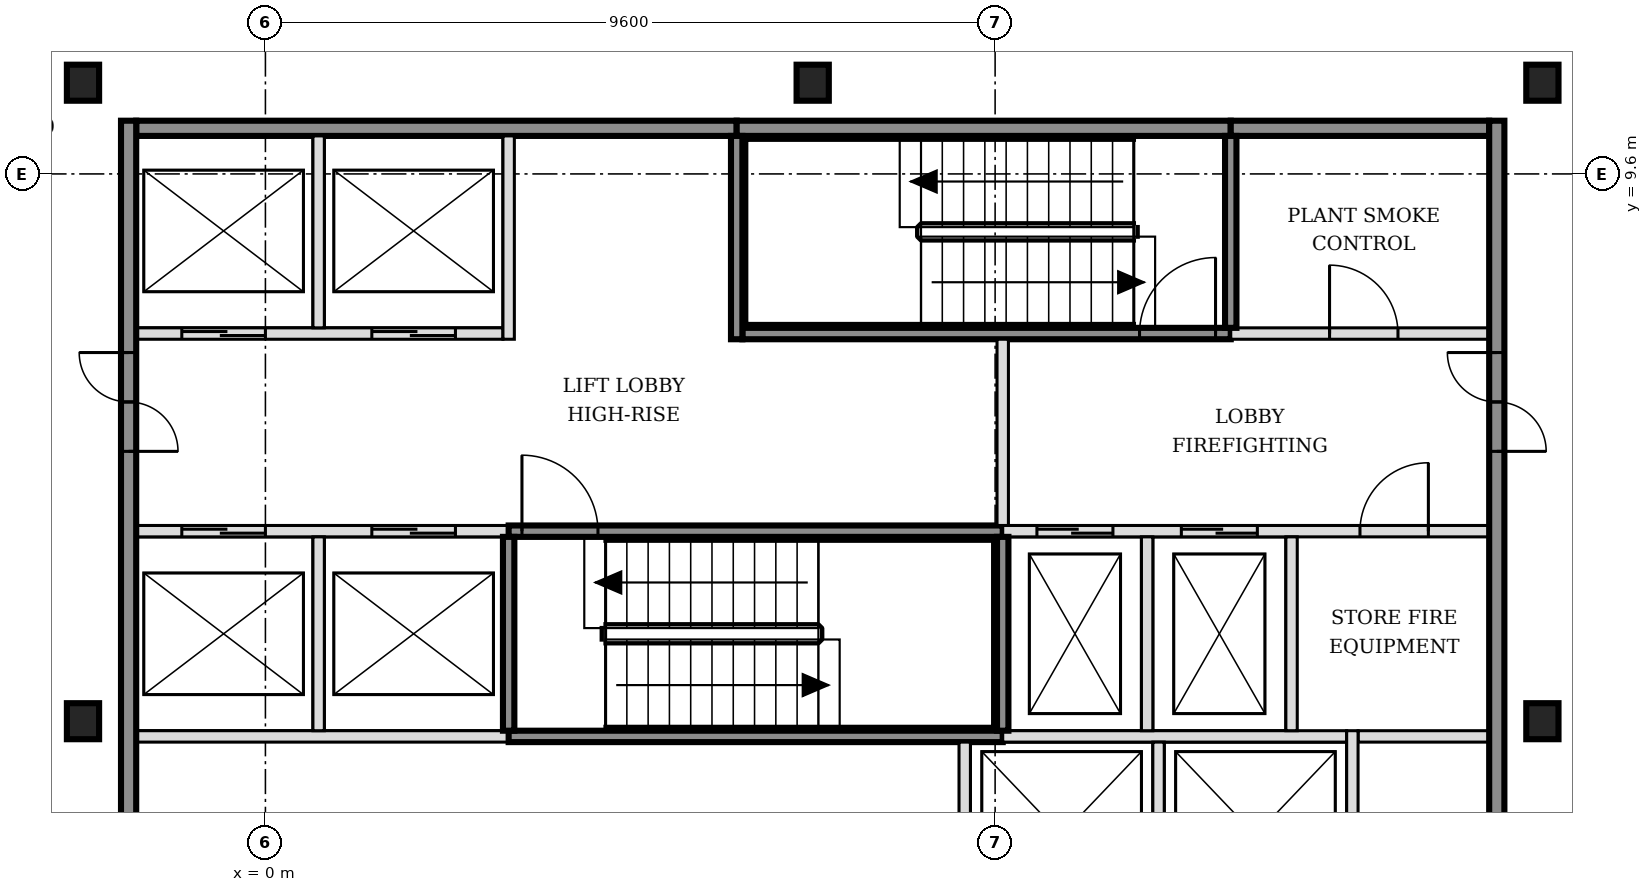
"""IFC4 building model, lengths in metres.
Left out: names, types, materials, properties, quantities, classifications, styles, units other than length and angle.
Written with IfcOpenShell. Run it as: python <this file> out.ifc"""

import sys

from ifc_helpers import new_model, si_unit, direction, frame, frame_2d, origin, origin_2d, place, context, subcontext, project, spatial, rectangle, i_section, extrude, element, fill, save


model = new_model("IFC4")
c1 = context("Model", 3, precision=1e-05, world=origin(), true_north=direction((0.0, 1.0)))
c2 = subcontext(c1, "Body", "Model", "MODEL_VIEW")
j1 = project(units=[si_unit("LENGTHUNIT", "METRE"), si_unit("PLANEANGLEUNIT", "RADIAN")], contexts=[c1])
p1 = place(None, origin())
s1 = spatial("IfcSite", under=j1, at=p1, CompositionType="ELEMENT")
p2 = place(p1, origin())
s2 = spatial("IfcBuilding", under=s1, at=p2, CompositionType="ELEMENT")
p3 = place(p2, frame((0.0, 0.0, 143.4)))
s3 = spatial("IfcBuildingStorey", under=s2, at=p3, CompositionType="ELEMENT", Elevation=143.4)
for number, where, z_axis, x_axis in (
    (1, (-2.4, 2.4, -0.15), (0.0, 0.0, 1.0), (1.0, 0.0, 0.0)),
    (2, (16.8, 2.4, -0.15), (0.0, 0.0, 1.0), (1.0, 0.0, 0.0)),
    (3, (-2.4, 10.8, -0.15), (0.0, 0.0, 1.0), (1.0, 0.0, 0.0)),
    (4, (7.2, 10.8, -0.15), (0.0, 0.0, 1.0), (1.0, 0.0, 0.0)),
    (5, (16.8, 10.8, -0.15), (0.0, 0.0, 1.0), (1.0, 0.0, 0.0)),
):
    element("IfcColumn", number, at=place(p3, frame(where, z_axis=z_axis, x_axis=x_axis)), inside=s3, PredefinedType="COLUMN", context=c2, shape_type="SweptSolid", body=[
        extrude(i_section(OverallWidth=0.424, OverallDepth=0.474, WebThickness=0.048, FlangeThickness=0.077, FilletRadius=0.015, at=origin_2d()), origin(), (0.0, 0.0, 1.0), 3.6),
    ])
p4 = place(p3, frame((-1.7, 2.2, 0.0), z_axis=(0.0, 0.0, 1.0), x_axis=(1.0, 0.0, 0.0)))
e6 = element("IfcWall", 6, at=p4, inside=s3, PredefinedType="SOLIDWALL", context=c2, shape_type="SweptSolid", body=[
    extrude(rectangle(XDim=4.9, YDim=0.15, at=frame_2d((2.45, 0.0))), origin(), (0.0, 0.0, 1.0), 3.45),
])
p5 = place(p3, frame((3.2, 2.2, 0.0), z_axis=(0.0, 0.0, 1.0), x_axis=(1.0, 0.0, 0.0)))
e7 = element("IfcWall", 7, at=p5, inside=s3, PredefinedType="SOLIDWALL", context=c2, shape_type="SweptSolid", body=[
    extrude(rectangle(XDim=6.5, YDim=0.15, at=frame_2d((3.25, 0.0))), origin(), (0.0, 0.0, 1.0), 3.45),
])
p6 = place(p3, frame((9.7, 2.2, 0.0), z_axis=(0.0, 0.0, 1.0), x_axis=(1.0, 0.0, 0.0)))
e8 = element("IfcWall", 8, at=p6, inside=s3, PredefinedType="SOLIDWALL", context=c2, shape_type="SweptSolid", body=[
    extrude(rectangle(XDim=4.525, YDim=0.15, at=frame_2d((2.263, 0.0))), origin(), (0.0, 0.0, 1.0), 3.45),
])
p7 = place(p3, frame((14.375, 2.2, 0.0), z_axis=(0.0, 0.0, 1.0), x_axis=(1.0, 0.0, 0.0)))
e9 = element("IfcWall", 9, at=p7, inside=s3, PredefinedType="PARTITIONING", context=c2, shape_type="SweptSolid", body=[
    extrude(rectangle(XDim=1.725, YDim=0.15, at=frame_2d((0.863, 0.0))), origin(), (0.0, 0.0, 1.0), 3.45),
])
p8 = place(p3, frame((-1.7, 4.9, 0.0), z_axis=(0.0, 0.0, 1.0), x_axis=(1.0, 0.0, 0.0)))
e10 = element("IfcWall", 10, at=p8, inside=s3, PredefinedType="SOLIDWALL", context=c2, shape_type="SweptSolid", body=[
    extrude(rectangle(XDim=4.9, YDim=0.15, at=frame_2d((2.45, 0.0))), origin(), (0.0, 0.0, 1.0), 3.45),
])
p9 = place(p8, frame((0.6, 0.0, 0.0)))
e11 = element("IfcOpeningElement", 11, at=p9, cuts=e10, PredefinedType="OPENING", context=c2, shape_type="SweptSolid", body=[
    extrude(rectangle(XDim=1.1, YDim=2.1, at=frame_2d((0.55, 1.05))), frame((0.0, 0.085, 0.0), z_axis=(0.0, -1.0, 0.0), x_axis=(1.0, 0.0, 0.0)), (0.0, 0.0, 1.0), 0.17),
])
p10 = place(p8, frame((3.1, 0.0, 0.0)))
e12 = element("IfcOpeningElement", 12, at=p10, cuts=e10, PredefinedType="OPENING", context=c2, shape_type="SweptSolid", body=[
    extrude(rectangle(XDim=1.1, YDim=2.1, at=frame_2d((0.55, 1.05))), frame((0.0, 0.085, 0.0), z_axis=(0.0, -1.0, 0.0), x_axis=(1.0, 0.0, 0.0)), (0.0, 0.0, 1.0), 0.17),
])
p11 = place(p3, frame((3.2, 4.9, 0.0), z_axis=(0.0, 0.0, 1.0), x_axis=(1.0, 0.0, 0.0)))
e13 = element("IfcWall", 13, at=p11, inside=s3, PredefinedType="SOLIDWALL", context=c2, shape_type="SweptSolid", body=[
    extrude(rectangle(XDim=6.5, YDim=0.15, at=frame_2d((3.25, 0.0))), origin(), (0.0, 0.0, 1.0), 3.45),
])
p12 = place(p11, frame((0.175, 0.0, 0.0)))
e14 = element("IfcOpeningElement", 14, at=p12, cuts=e13, PredefinedType="OPENING", context=c2, shape_type="SweptSolid", body=[
    extrude(rectangle(XDim=1.0, YDim=2.1, at=frame_2d((0.5, 1.05))), frame((0.0, 0.085, 0.0), z_axis=(0.0, -1.0, 0.0), x_axis=(1.0, 0.0, 0.0)), (0.0, 0.0, 1.0), 0.17),
])
p13 = place(p3, frame((9.7, 4.9, 0.0), z_axis=(0.0, 0.0, 1.0), x_axis=(1.0, 0.0, 0.0)))
e15 = element("IfcWall", 15, at=p13, inside=s3, PredefinedType="SOLIDWALL", context=c2, shape_type="SweptSolid", body=[
    extrude(rectangle(XDim=6.4, YDim=0.15, at=frame_2d((3.2, 0.0))), origin(), (0.0, 0.0, 1.0), 3.45),
])
p14 = place(p13, frame((0.45, 0.0, 0.0)))
e16 = element("IfcOpeningElement", 16, at=p14, cuts=e15, PredefinedType="OPENING", context=c2, shape_type="SweptSolid", body=[
    extrude(rectangle(XDim=1.0, YDim=2.1, at=frame_2d((0.5, 1.05))), frame((0.0, 0.085, 0.0), z_axis=(0.0, -1.0, 0.0), x_axis=(1.0, 0.0, 0.0)), (0.0, 0.0, 1.0), 0.17),
])
p15 = place(p13, frame((2.35, 0.0, 0.0)))
e17 = element("IfcOpeningElement", 17, at=p15, cuts=e15, PredefinedType="OPENING", context=c2, shape_type="SweptSolid", body=[
    extrude(rectangle(XDim=1.0, YDim=2.1, at=frame_2d((0.5, 1.05))), frame((0.0, 0.085, 0.0), z_axis=(0.0, -1.0, 0.0), x_axis=(1.0, 0.0, 0.0)), (0.0, 0.0, 1.0), 0.17),
])
p16 = place(p13, frame((4.7, 0.0, 0.0)))
e18 = element("IfcOpeningElement", 18, at=p16, cuts=e15, PredefinedType="OPENING", context=c2, shape_type="SweptSolid", body=[
    extrude(rectangle(XDim=0.9, YDim=2.1, at=frame_2d((0.45, 1.05))), frame((0.0, 0.085, 0.0), z_axis=(0.0, -1.0, 0.0), x_axis=(1.0, 0.0, 0.0)), (0.0, 0.0, 1.0), 0.17),
])
p17 = place(p3, frame((-1.7, 7.5, 0.0), z_axis=(0.0, 0.0, 1.0), x_axis=(1.0, 0.0, 0.0)))
e19 = element("IfcWall", 19, at=p17, inside=s3, PredefinedType="SOLIDWALL", context=c2, shape_type="SweptSolid", body=[
    extrude(rectangle(XDim=4.825, YDim=0.15, at=frame_2d((2.413, 0.0))), origin(), (0.0, 0.0, 1.0), 3.45),
])
p18 = place(p17, frame((0.6, 0.0, 0.0)))
e20 = element("IfcOpeningElement", 20, at=p18, cuts=e19, PredefinedType="OPENING", context=c2, shape_type="SweptSolid", body=[
    extrude(rectangle(XDim=1.1, YDim=2.1, at=frame_2d((0.55, 1.05))), frame((0.0, 0.085, 0.0), z_axis=(0.0, -1.0, 0.0), x_axis=(1.0, 0.0, 0.0)), (0.0, 0.0, 1.0), 0.17),
])
p19 = place(p17, frame((3.1, 0.0, 0.0)))
e21 = element("IfcOpeningElement", 21, at=p19, cuts=e19, PredefinedType="OPENING", context=c2, shape_type="SweptSolid", body=[
    extrude(rectangle(XDim=1.1, YDim=2.1, at=frame_2d((0.55, 1.05))), frame((0.0, 0.085, 0.0), z_axis=(0.0, -1.0, 0.0), x_axis=(1.0, 0.0, 0.0)), (0.0, 0.0, 1.0), 0.17),
])
p20 = place(p3, frame((6.275, 7.5, 0.0), z_axis=(0.0, 0.0, 1.0), x_axis=(1.0, 0.0, 0.0)))
e22 = element("IfcWall", 22, at=p20, inside=s3, PredefinedType="SOLIDWALL", context=c2, shape_type="SweptSolid", body=[
    extrude(rectangle(XDim=6.425, YDim=0.15, at=frame_2d((3.212, 0.0))), origin(), (0.0, 0.0, 1.0), 3.45),
])
p21 = place(p20, frame((5.225, 0.0, 0.0)))
e23 = element("IfcOpeningElement", 23, at=p21, cuts=e22, PredefinedType="OPENING", context=c2, shape_type="SweptSolid", body=[
    extrude(rectangle(XDim=1.0, YDim=2.1, at=frame_2d((0.5, 1.05))), frame((0.0, 0.085, 0.0), z_axis=(0.0, -1.0, 0.0), x_axis=(1.0, 0.0, 0.0)), (0.0, 0.0, 1.0), 0.17),
])
p22 = place(p3, frame((12.7, 7.5, 0.0), z_axis=(0.0, 0.0, 1.0), x_axis=(1.0, 0.0, 0.0)))
e24 = element("IfcWall", 24, at=p22, inside=s3, PredefinedType="SOLIDWALL", context=c2, shape_type="SweptSolid", body=[
    extrude(rectangle(XDim=3.4, YDim=0.15, at=frame_2d((1.7, 0.0))), origin(), (0.0, 0.0, 1.0), 3.45),
])
p23 = place(p22, frame((1.3, 0.0, 0.0)))
e25 = element("IfcOpeningElement", 25, at=p23, cuts=e24, PredefinedType="OPENING", context=c2, shape_type="SweptSolid", body=[
    extrude(rectangle(XDim=0.9, YDim=2.1, at=frame_2d((0.45, 1.05))), frame((0.0, 0.085, 0.0), z_axis=(0.0, -1.0, 0.0), x_axis=(1.0, 0.0, 0.0)), (0.0, 0.0, 1.0), 0.17),
])
p24 = place(p3, frame((-1.7, 10.2, 0.0), z_axis=(0.0, 0.0, 1.0), x_axis=(1.0, 0.0, 0.0)))
e26 = element("IfcWall", 26, at=p24, inside=s3, PredefinedType="SOLIDWALL", context=c2, shape_type="SweptSolid", body=[
    extrude(rectangle(XDim=7.9, YDim=0.2, at=frame_2d((3.95, 0.0))), origin(), (0.0, 0.0, 1.0), 3.45),
])
p25 = place(p3, frame((6.2, 10.2, 0.0), z_axis=(0.0, 0.0, 1.0), x_axis=(1.0, 0.0, 0.0)))
e27 = element("IfcWall", 27, at=p25, inside=s3, PredefinedType="SOLIDWALL", context=c2, shape_type="SweptSolid", body=[
    extrude(rectangle(XDim=6.5, YDim=0.2, at=frame_2d((3.25, 0.0))), origin(), (0.0, 0.0, 1.0), 3.45),
])
p26 = place(p3, frame((12.7, 10.2, 0.0), z_axis=(0.0, 0.0, 1.0), x_axis=(1.0, 0.0, 0.0)))
e28 = element("IfcWall", 28, at=p26, inside=s3, PredefinedType="SOLIDWALL", context=c2, shape_type="SweptSolid", body=[
    extrude(rectangle(XDim=3.4, YDim=0.2, at=frame_2d((1.7, 0.0))), origin(), (0.0, 0.0, 1.0), 3.45),
])
p27 = place(p3, frame((-1.8, -5.5, 0.0), z_axis=(0.0, 0.0, 1.0), x_axis=(0.0, 1.0, 0.0)))
e29 = element("IfcWall", 29, at=p27, inside=s3, PredefinedType="SOLIDWALL", context=c2, shape_type="SweptSolid", body=[
    extrude(rectangle(XDim=15.8, YDim=0.2, at=frame_2d((7.9, 0.0))), origin(), (0.0, 0.0, 1.0), 3.45),
])
p28 = place(p27, frame((3.05, 0.0, 0.0)))
e30 = element("IfcOpeningElement", 30, at=p28, cuts=e29, PredefinedType="OPENING", context=c2, shape_type="SweptSolid", body=[
    extrude(rectangle(XDim=1.3, YDim=2.1, at=frame_2d((0.65, 1.05))), frame((0.0, 0.11, 0.0), z_axis=(0.0, -1.0, 0.0), x_axis=(1.0, 0.0, 0.0)), (0.0, 0.0, 1.0), 0.22),
])
p29 = place(p27, frame((11.45, 0.0, 0.0)))
e31 = element("IfcOpeningElement", 31, at=p29, cuts=e29, PredefinedType="OPENING", context=c2, shape_type="SweptSolid", body=[
    extrude(rectangle(XDim=1.3, YDim=2.1, at=frame_2d((0.65, 1.05))), frame((0.0, 0.11, 0.0), z_axis=(0.0, -1.0, 0.0), x_axis=(1.0, 0.0, 0.0)), (0.0, 0.0, 1.0), 0.22),
])
p30 = place(p3, frame((0.7, 2.275, 0.0), z_axis=(0.0, 0.0, 1.0), x_axis=(0.0, 1.0, 0.0)))
e32 = element("IfcWall", 32, at=p30, inside=s3, PredefinedType="SOLIDWALL", context=c2, shape_type="SweptSolid", body=[
    extrude(rectangle(XDim=2.55, YDim=0.15, at=frame_2d((1.275, 0.0))), origin(), (0.0, 0.0, 1.0), 3.45),
])
p31 = place(p3, frame((0.7, 7.575, 0.0), z_axis=(0.0, 0.0, 1.0), x_axis=(0.0, 1.0, 0.0)))
e33 = element("IfcWall", 33, at=p31, inside=s3, PredefinedType="SOLIDWALL", context=c2, shape_type="SweptSolid", body=[
    extrude(rectangle(XDim=2.525, YDim=0.15, at=frame_2d((1.263, 0.0))), origin(), (0.0, 0.0, 1.0), 3.45),
])
p32 = place(p3, frame((3.2, 2.275, 0.0), z_axis=(0.0, 0.0, 1.0), x_axis=(0.0, 1.0, 0.0)))
e34 = element("IfcWall", 34, at=p32, inside=s3, PredefinedType="SOLIDWALL", context=c2, shape_type="SweptSolid", body=[
    extrude(rectangle(XDim=2.55, YDim=0.15, at=frame_2d((1.275, 0.0))), origin(), (0.0, 0.0, 1.0), 3.45),
])
for number, where, z_axis, x_axis in (
    (35, (3.2, 7.425, 0.0), (0.0, 0.0, 1.0), (0.0, 1.0, 0.0)),
    (36, (6.2, 7.425, 0.0), (0.0, 0.0, 1.0), (0.0, 1.0, 0.0)),
):
    element("IfcWall", number, at=place(p3, frame(where, z_axis=z_axis, x_axis=x_axis)), inside=s3, PredefinedType="SOLIDWALL", context=c2, shape_type="SweptSolid", body=[
        extrude(rectangle(XDim=2.675, YDim=0.15, at=frame_2d((1.337, 0.0))), origin(), (0.0, 0.0, 1.0), 3.45),
    ])
p33 = place(p3, frame((9.2, -0.475, 0.0), z_axis=(0.0, 0.0, 1.0), x_axis=(0.0, 1.0, 0.0)))
e37 = element("IfcWall", 37, at=p33, inside=s3, PredefinedType="SOLIDWALL", context=c2, shape_type="SweptSolid", body=[
    extrude(rectangle(XDim=2.6, YDim=0.15, at=frame_2d((1.3, 0.0))), origin(), (0.0, 0.0, 1.0), 3.45),
])
p34 = place(p3, frame((9.7, 2.275, 0.0), z_axis=(0.0, 0.0, 1.0), x_axis=(0.0, 1.0, 0.0)))
e38 = element("IfcWall", 38, at=p34, inside=s3, PredefinedType="SOLIDWALL", context=c2, shape_type="SweptSolid", body=[
    extrude(rectangle(XDim=2.55, YDim=0.15, at=frame_2d((1.275, 0.0))), origin(), (0.0, 0.0, 1.0), 3.45),
])
p35 = place(p3, frame((9.7, 4.975, 0.0), z_axis=(0.0, 0.0, 1.0), x_axis=(0.0, 1.0, 0.0)))
e39 = element("IfcWall", 39, at=p35, inside=s3, PredefinedType="SOLIDWALL", context=c2, shape_type="SweptSolid", body=[
    extrude(rectangle(XDim=2.45, YDim=0.15, at=frame_2d((1.225, 0.0))), origin(), (0.0, 0.0, 1.0), 3.45),
])
p36 = place(p3, frame((11.6, 2.275, 0.0), z_axis=(0.0, 0.0, 1.0), x_axis=(0.0, 1.0, 0.0)))
e40 = element("IfcWall", 40, at=p36, inside=s3, PredefinedType="SOLIDWALL", context=c2, shape_type="SweptSolid", body=[
    extrude(rectangle(XDim=2.55, YDim=0.15, at=frame_2d((1.275, 0.0))), origin(), (0.0, 0.0, 1.0), 3.45),
])
p37 = place(p3, frame((11.75, -0.325, 0.0), z_axis=(0.0, 0.0, 1.0), x_axis=(0.0, 1.0, 0.0)))
e41 = element("IfcWall", 41, at=p37, inside=s3, PredefinedType="SOLIDWALL", context=c2, shape_type="SweptSolid", body=[
    extrude(rectangle(XDim=2.45, YDim=0.15, at=frame_2d((1.225, 0.0))), origin(), (0.0, 0.0, 1.0), 3.45),
])
p38 = place(p3, frame((12.7, 7.575, 0.0), z_axis=(0.0, 0.0, 1.0), x_axis=(0.0, 1.0, 0.0)))
e42 = element("IfcWall", 42, at=p38, inside=s3, PredefinedType="SOLIDWALL", context=c2, shape_type="SweptSolid", body=[
    extrude(rectangle(XDim=2.525, YDim=0.15, at=frame_2d((1.263, 0.0))), origin(), (0.0, 0.0, 1.0), 3.45),
])
p39 = place(p3, frame((13.5, 2.275, 0.0), z_axis=(0.0, 0.0, 1.0), x_axis=(0.0, 1.0, 0.0)))
e43 = element("IfcWall", 43, at=p39, inside=s3, PredefinedType="SOLIDWALL", context=c2, shape_type="SweptSolid", body=[
    extrude(rectangle(XDim=2.55, YDim=0.15, at=frame_2d((1.275, 0.0))), origin(), (0.0, 0.0, 1.0), 3.45),
])
p40 = place(p3, frame((14.3, -0.475, 0.0), z_axis=(0.0, 0.0, 1.0), x_axis=(0.0, 1.0, 0.0)))
e44 = element("IfcWall", 44, at=p40, inside=s3, PredefinedType="SOLIDWALL", context=c2, shape_type="SweptSolid", body=[
    extrude(rectangle(XDim=2.75, YDim=0.15, at=frame_2d((1.375, 0.0))), origin(), (0.0, 0.0, 1.0), 3.45),
])
p41 = place(p3, frame((16.2, -5.5, 0.0), z_axis=(0.0, 0.0, 1.0), x_axis=(0.0, 1.0, 0.0)))
e45 = element("IfcWall", 45, at=p41, inside=s3, PredefinedType="SOLIDWALL", context=c2, shape_type="SweptSolid", body=[
    extrude(rectangle(XDim=15.8, YDim=0.2, at=frame_2d((7.9, 0.0))), origin(), (0.0, 0.0, 1.0), 3.45),
])
p42 = place(p41, frame((3.05, 0.0, 0.0)))
e46 = element("IfcOpeningElement", 46, at=p42, cuts=e45, PredefinedType="OPENING", context=c2, shape_type="SweptSolid", body=[
    extrude(rectangle(XDim=1.3, YDim=2.1, at=frame_2d((0.65, 1.05))), frame((0.0, 0.11, 0.0), z_axis=(0.0, -1.0, 0.0), x_axis=(1.0, 0.0, 0.0)), (0.0, 0.0, 1.0), 0.22),
])
p43 = place(p41, frame((11.45, 0.0, 0.0)))
e47 = element("IfcOpeningElement", 47, at=p43, cuts=e45, PredefinedType="OPENING", context=c2, shape_type="SweptSolid", body=[
    extrude(rectangle(XDim=1.3, YDim=2.1, at=frame_2d((0.65, 1.05))), frame((0.0, 0.11, 0.0), z_axis=(0.0, -1.0, 0.0), x_axis=(1.0, 0.0, 0.0)), (0.0, 0.0, 1.0), 0.22),
])
p44 = place(p9, origin())
e48 = element("IfcDoor", 48, at=p44, inside=s3, OperationType="DOUBLE_DOOR_SLIDING", PredefinedType="DOOR", context=c2, shape_type="SweptSolid", body=[
    extrude(rectangle(XDim=1.1, YDim=2.1, at=frame_2d((0.55, 1.05))), frame((0.0, 0.025, 0.0), z_axis=(0.0, -1.0, 0.0), x_axis=(1.0, 0.0, 0.0)), (0.0, 0.0, 1.0), 0.05),
])
fill(e11, e48)
p45 = place(p10, origin())
e49 = element("IfcDoor", 49, at=p45, inside=s3, OperationType="DOUBLE_DOOR_SLIDING", PredefinedType="DOOR", context=c2, shape_type="SweptSolid", body=[
    extrude(rectangle(XDim=1.1, YDim=2.1, at=frame_2d((0.55, 1.05))), frame((0.0, 0.025, 0.0), z_axis=(0.0, -1.0, 0.0), x_axis=(1.0, 0.0, 0.0)), (0.0, 0.0, 1.0), 0.05),
])
fill(e12, e49)
p46 = place(p18, origin())
e50 = element("IfcDoor", 50, at=p46, inside=s3, OperationType="DOUBLE_DOOR_SLIDING", PredefinedType="DOOR", context=c2, shape_type="SweptSolid", body=[
    extrude(rectangle(XDim=1.1, YDim=2.1, at=frame_2d((0.55, 1.05))), frame((0.0, 0.025, 0.0), z_axis=(0.0, -1.0, 0.0), x_axis=(1.0, 0.0, 0.0)), (0.0, 0.0, 1.0), 0.05),
])
fill(e20, e50)
p47 = place(p19, origin())
e51 = element("IfcDoor", 51, at=p47, inside=s3, OperationType="DOUBLE_DOOR_SLIDING", PredefinedType="DOOR", context=c2, shape_type="SweptSolid", body=[
    extrude(rectangle(XDim=1.1, YDim=2.1, at=frame_2d((0.55, 1.05))), frame((0.0, 0.025, 0.0), z_axis=(0.0, -1.0, 0.0), x_axis=(1.0, 0.0, 0.0)), (0.0, 0.0, 1.0), 0.05),
])
fill(e21, e51)
p48 = place(p14, origin())
e52 = element("IfcDoor", 52, at=p48, inside=s3, OperationType="DOUBLE_DOOR_SLIDING", PredefinedType="DOOR", context=c2, shape_type="SweptSolid", body=[
    extrude(rectangle(XDim=1.0, YDim=2.1, at=frame_2d((0.5, 1.05))), frame((0.0, 0.025, 0.0), z_axis=(0.0, -1.0, 0.0), x_axis=(1.0, 0.0, 0.0)), (0.0, 0.0, 1.0), 0.05),
])
fill(e16, e52)
p49 = place(p15, origin())
e53 = element("IfcDoor", 53, at=p49, inside=s3, OperationType="DOUBLE_DOOR_SLIDING", PredefinedType="DOOR", context=c2, shape_type="SweptSolid", body=[
    extrude(rectangle(XDim=1.0, YDim=2.1, at=frame_2d((0.5, 1.05))), frame((0.0, 0.025, 0.0), z_axis=(0.0, -1.0, 0.0), x_axis=(1.0, 0.0, 0.0)), (0.0, 0.0, 1.0), 0.05),
])
fill(e17, e53)
p50 = place(p12, origin())
e54 = element("IfcDoor", 54, at=p50, inside=s3, OperationType="SINGLE_SWING_LEFT", PredefinedType="DOOR", context=c2, shape_type="SweptSolid", body=[
    extrude(rectangle(XDim=1.0, YDim=2.1, at=frame_2d((0.5, 1.05))), frame((0.0, 0.025, 0.0), z_axis=(0.0, -1.0, 0.0), x_axis=(1.0, 0.0, 0.0)), (0.0, 0.0, 1.0), 0.05),
])
fill(e14, e54)
p51 = place(p21, origin())
e55 = element("IfcDoor", 55, at=p51, inside=s3, OperationType="SINGLE_SWING_RIGHT", PredefinedType="DOOR", context=c2, shape_type="SweptSolid", body=[
    extrude(rectangle(XDim=1.0, YDim=2.1, at=frame_2d((0.5, 1.05))), frame((0.0, 0.025, 0.0), z_axis=(0.0, -1.0, 0.0), x_axis=(1.0, 0.0, 0.0)), (0.0, 0.0, 1.0), 0.05),
])
fill(e23, e55)
p52 = place(p29, origin())
e56 = element("IfcDoor", 56, at=p52, inside=s3, OperationType="DOUBLE_DOOR_SINGLE_SWING", PredefinedType="DOOR", context=c2, shape_type="SweptSolid", body=[
    extrude(rectangle(XDim=1.3, YDim=2.1, at=frame_2d((0.65, 1.05))), frame((0.0, 0.025, 0.0), z_axis=(0.0, -1.0, 0.0), x_axis=(1.0, 0.0, 0.0)), (0.0, 0.0, 1.0), 0.05),
])
fill(e31, e56)
p53 = place(p43, origin())
e57 = element("IfcDoor", 57, at=p53, inside=s3, OperationType="DOUBLE_DOOR_SINGLE_SWING", PredefinedType="DOOR", context=c2, shape_type="SweptSolid", body=[
    extrude(rectangle(XDim=1.3, YDim=2.1, at=frame_2d((0.65, 1.05))), frame((0.0, 0.025, 0.0), z_axis=(0.0, -1.0, 0.0), x_axis=(1.0, 0.0, 0.0)), (0.0, 0.0, 1.0), 0.05),
])
fill(e47, e57)
p54 = place(p16, origin())
e58 = element("IfcDoor", 58, at=p54, inside=s3, OperationType="SINGLE_SWING_RIGHT", PredefinedType="DOOR", context=c2, shape_type="SweptSolid", body=[
    extrude(rectangle(XDim=0.9, YDim=2.1, at=frame_2d((0.45, 1.05))), frame((0.0, 0.025, 0.0), z_axis=(0.0, -1.0, 0.0), x_axis=(1.0, 0.0, 0.0)), (0.0, 0.0, 1.0), 0.05),
])
fill(e18, e58)
p55 = place(p23, origin())
e59 = element("IfcDoor", 59, at=p55, inside=s3, OperationType="SINGLE_SWING_LEFT", PredefinedType="DOOR", context=c2, shape_type="SweptSolid", body=[
    extrude(rectangle(XDim=0.9, YDim=2.1, at=frame_2d((0.45, 1.05))), frame((0.0, 0.025, 0.0), z_axis=(0.0, -1.0, 0.0), x_axis=(1.0, 0.0, 0.0)), (0.0, 0.0, 1.0), 0.05),
])
fill(e25, e59)
save(model, sys.argv[1])
